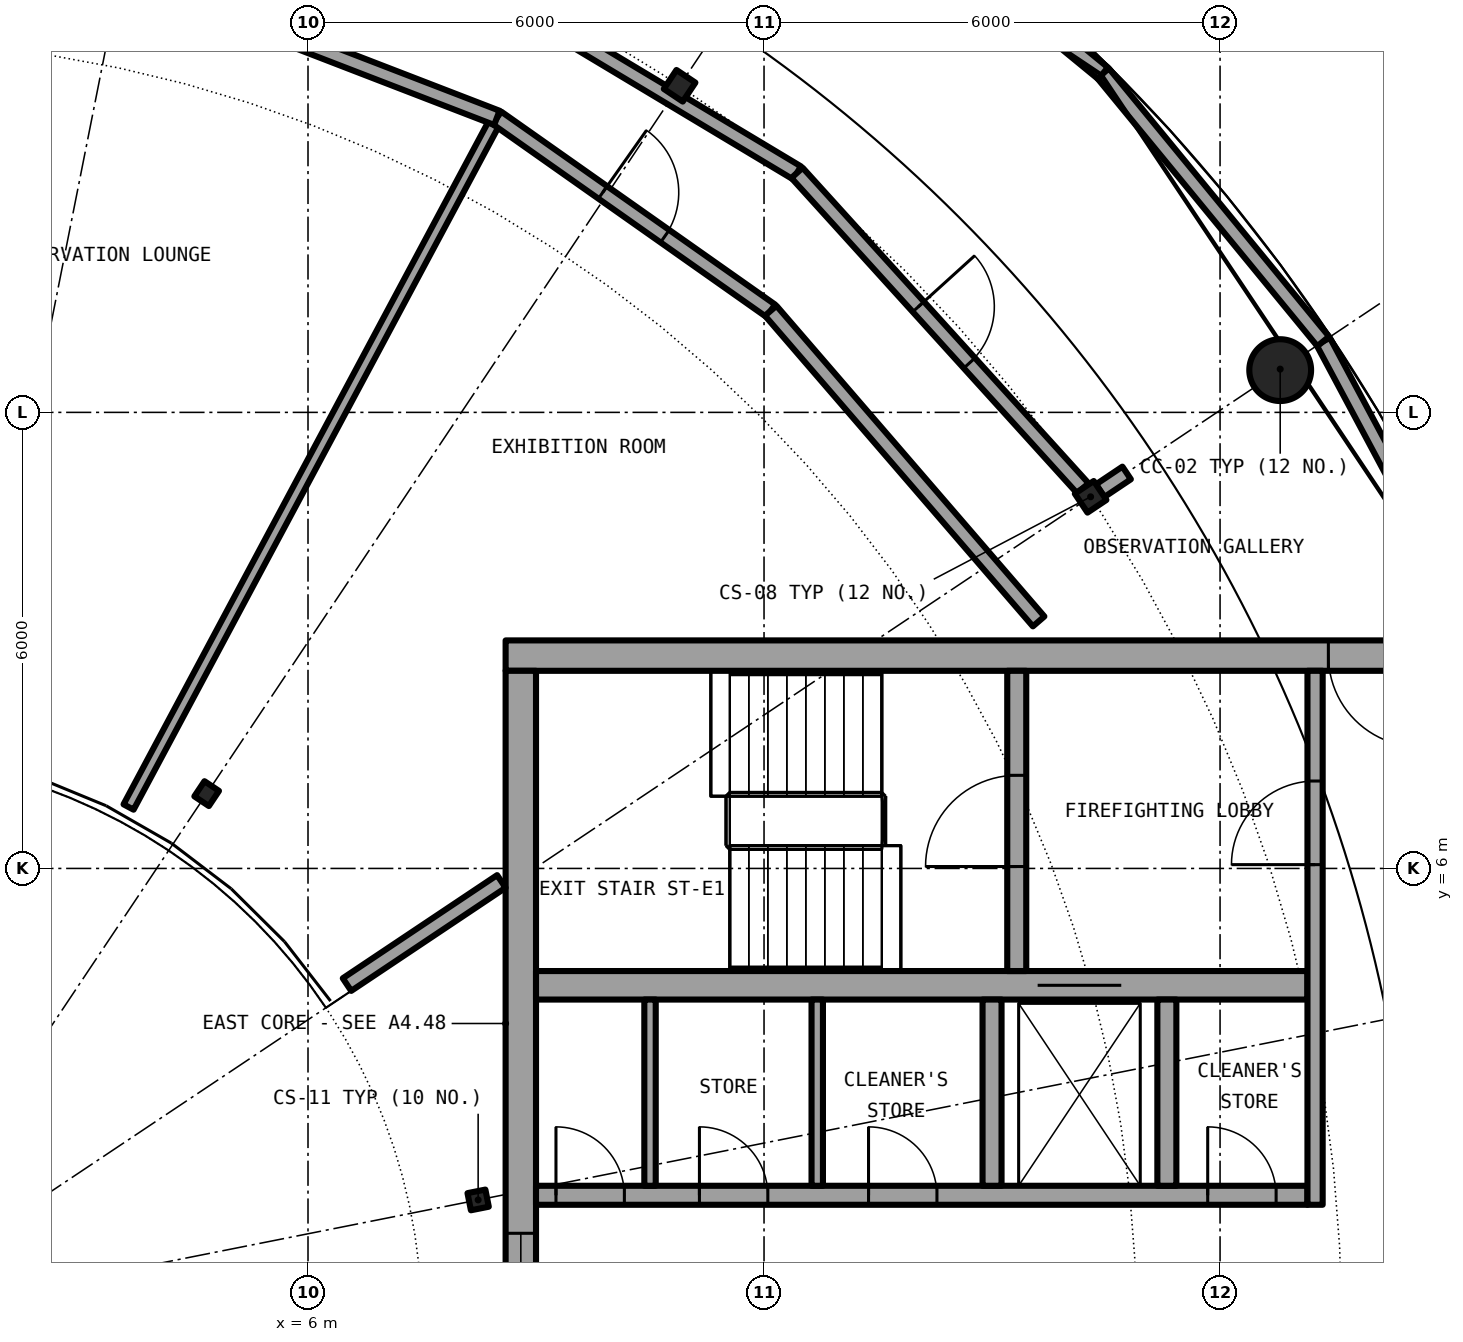
"""IFC4 building model, lengths in metres.
Left out: names, types, materials, properties, quantities, classifications, styles, units other than length and angle.
Written with IfcOpenShell. Run it as: python <this file> out.ifc"""

import sys

from ifc_helpers import new_model, si_unit, direction, frame, frame_2d, origin, origin_2d, place, context, subcontext, project, spatial, rectangle, hollow_circle, i_section, extrude, element, fill, save


model = new_model("IFC4")
c1 = context("Model", 3, precision=1e-05, world=origin(), true_north=direction((0.0, 1.0)))
c2 = subcontext(c1, "Body", "Model", "MODEL_VIEW")
j1 = project(units=[si_unit("LENGTHUNIT", "METRE"), si_unit("PLANEANGLEUNIT", "RADIAN")], contexts=[c1])
p1 = place(None, origin())
s1 = spatial("IfcSite", under=j1, at=p1, CompositionType="ELEMENT")
p2 = place(p1, origin())
s2 = spatial("IfcBuilding", under=s1, at=p2, CompositionType="ELEMENT")
p3 = place(p2, frame((0.0, 0.0, 255.4)))
s3 = spatial("IfcBuildingStorey", under=s2, at=p3, CompositionType="ELEMENT", Elevation=255.4)
p4 = place(p3, frame((18.791, 12.556, 0.0), z_axis=(0.0, 0.0, 1.0), x_axis=(1.0, 0.0, 0.0)))
e1 = element("IfcColumn", 1, at=p4, inside=s3, PredefinedType="COLUMN", context=c2, shape_type="SweptSolid", body=[
    extrude(hollow_circle(Radius=0.406, WallThickness=0.03, at=origin_2d()), origin(), (0.0, 0.0, 1.0), 6.1),
])
for number, where, z_axis, x_axis in (
    (2, (16.297, 10.889, 0.0), (0.0, 0.0, 1.0), (0.831, 0.556, 0.0)),
    (3, (10.889, 16.297, 0.0), (0.0, 0.0, 1.0), (0.556, 0.831, 0.0)),
):
    element("IfcColumn", number, at=place(p3, frame(where, z_axis=z_axis, x_axis=x_axis)), inside=s3, PredefinedType="COLUMN", context=c2, shape_type="SweptSolid", body=[
        extrude(i_section(OverallWidth=0.3, OverallDepth=0.3, WebThickness=0.011, FlangeThickness=0.019, FilletRadius=0.027, at=origin_2d()), origin(), (0.0, 0.0, 1.0), 6.1),
    ])
for number, where, z_axis, x_axis in (
    (4, (8.239, 1.639, 0.0), (0.0, 0.0, 1.0), (0.981, 0.195, 0.0)),
    (5, (4.667, 6.984, 0.0), (0.0, 0.0, 1.0), (0.556, 0.831, 0.0)),
):
    element("IfcColumn", number, at=place(p3, frame(where, z_axis=z_axis, x_axis=x_axis)), inside=s3, PredefinedType="COLUMN", context=c2, shape_type="SweptSolid", body=[
        extrude(i_section(OverallWidth=0.24, OverallDepth=0.23, WebThickness=0.008, FlangeThickness=0.012, FilletRadius=0.021, at=origin_2d()), origin(), (0.0, 0.0, 1.0), 6.1),
    ])
p5 = place(p3, frame((21.508, 8.909, 6.1), z_axis=(0.0, 0.0, 1.0), x_axis=(-0.471334945511, 0.881954289711, 0.0)))
e6 = element("IfcWall", 6, at=p5, inside=s3, PredefinedType="PARAPET", context=c2, shape_type="SweptSolid", body=[
    extrude(rectangle(XDim=4.564, YDim=0.2, at=frame_2d((2.282, 0.0))), origin(), (0.0, 0.0, 1.0), 1.1),
])
for number, where, z_axis, x_axis in (
    (7, (19.357, 12.934, 6.1), (0.0, 0.0, 1.0), (-0.635, 0.773, 0.0)),
    (8, (16.461, 16.461, 6.1), (0.0, 0.0, 1.0), (-0.773, 0.635, 0.0)),
):
    element("IfcWall", number, at=place(p3, frame(where, z_axis=z_axis, x_axis=x_axis)), inside=s3, PredefinedType="PARAPET", context=c2, shape_type="SweptSolid", body=[
        extrude(rectangle(XDim=4.563, YDim=0.2, at=frame_2d((2.282, 0.0))), origin(), (0.0, 0.0, 1.0), 1.1),
    ])
p6 = place(p3, frame((21.1, 8.8, 0.0), z_axis=(0.0, 0.0, 1.0), x_axis=(-1.0, 0.0, 0.0)))
e9 = element("IfcWall", 9, at=p6, inside=s3, PredefinedType="SHEAR", context=c2, shape_type="SweptSolid", body=[
    extrude(rectangle(XDim=12.5, YDim=0.4, at=frame_2d((6.25, 0.0))), origin(), (0.0, 0.0, 1.0), 6.1),
])
p7 = place(p6, frame((0.475, 0.0, 0.0)))
e10 = element("IfcOpeningElement", 10, at=p7, cuts=e9, PredefinedType="OPENING", context=c2, shape_type="SweptSolid", body=[
    extrude(rectangle(XDim=1.2, YDim=2.3, at=frame_2d((0.6, 1.15))), frame((0.0, 0.21, 0.0), z_axis=(0.0, -1.0, 0.0), x_axis=(1.0, 0.0, 0.0)), (0.0, 0.0, 1.0), 0.42),
])
p8 = place(p3, frame((8.8, -8.6, 0.0), z_axis=(0.0, 0.0, 1.0), x_axis=(0.0, 1.0, 0.0)))
e11 = element("IfcWall", 11, at=p8, inside=s3, PredefinedType="SHEAR", context=c2, shape_type="SweptSolid", body=[
    extrude(rectangle(XDim=17.2, YDim=0.4, at=frame_2d((8.6, 0.0))), origin(), (0.0, 0.0, 1.0), 6.1),
])
p9 = place(p8, frame((7.4, 0.0, 0.1)))
e12 = element("IfcOpeningElement", 12, at=p9, cuts=e11, PredefinedType="OPENING", context=c2, shape_type="SweptSolid", body=[
    extrude(rectangle(XDim=2.4, YDim=2.2, at=frame_2d((1.2, 1.1))), frame((0.0, 0.21, 0.0), z_axis=(0.0, -1.0, 0.0), x_axis=(1.0, 0.0, 0.0)), (0.0, 0.0, 1.0), 0.42),
])
p10 = place(p3, frame((9.0, 1.7, 0.0), z_axis=(0.0, 0.0, 1.0), x_axis=(1.0, 0.0, 0.0)))
e13 = element("IfcWall", 13, at=p10, inside=s3, PredefinedType="SHEAR", context=c2, shape_type="SweptSolid", body=[
    extrude(rectangle(XDim=10.15, YDim=0.25, at=frame_2d((5.075, 0.0))), origin(), (0.0, 0.0, 1.0), 6.1),
])
p11 = place(p10, frame((0.262, 0.0, 0.0)))
e14 = element("IfcOpeningElement", 14, at=p11, cuts=e13, PredefinedType="OPENING", context=c2, shape_type="SweptSolid", body=[
    extrude(rectangle(XDim=0.9, YDim=2.3, at=frame_2d((0.45, 1.15))), frame((0.0, 0.135, 0.0), z_axis=(0.0, -1.0, 0.0), x_axis=(1.0, 0.0, 0.0)), (0.0, 0.0, 1.0), 0.27),
])
p12 = place(p10, frame((2.15, 0.0, 0.0)))
e15 = element("IfcOpeningElement", 15, at=p12, cuts=e13, PredefinedType="OPENING", context=c2, shape_type="SweptSolid", body=[
    extrude(rectangle(XDim=0.9, YDim=2.3, at=frame_2d((0.45, 1.15))), frame((0.0, 0.135, 0.0), z_axis=(0.0, -1.0, 0.0), x_axis=(1.0, 0.0, 0.0)), (0.0, 0.0, 1.0), 0.27),
])
p13 = place(p10, frame((4.375, 0.0, 0.0)))
e16 = element("IfcOpeningElement", 16, at=p13, cuts=e13, PredefinedType="OPENING", context=c2, shape_type="SweptSolid", body=[
    extrude(rectangle(XDim=0.9, YDim=2.3, at=frame_2d((0.45, 1.15))), frame((0.0, 0.135, 0.0), z_axis=(0.0, -1.0, 0.0), x_axis=(1.0, 0.0, 0.0)), (0.0, 0.0, 1.0), 0.27),
])
p14 = place(p10, frame((8.837, 0.0, 0.0)))
e17 = element("IfcOpeningElement", 17, at=p14, cuts=e13, PredefinedType="OPENING", context=c2, shape_type="SweptSolid", body=[
    extrude(rectangle(XDim=0.9, YDim=2.3, at=frame_2d((0.45, 1.15))), frame((0.0, 0.135, 0.0), z_axis=(0.0, -1.0, 0.0), x_axis=(1.0, 0.0, 0.0)), (0.0, 0.0, 1.0), 0.27),
])
p15 = place(p3, frame((9.0, 4.462, 0.0), z_axis=(0.0, 0.0, 1.0), x_axis=(1.0, 0.0, 0.0)))
e18 = element("IfcWall", 18, at=p15, inside=s3, PredefinedType="SHEAR", context=c2, shape_type="SweptSolid", body=[
    extrude(rectangle(XDim=10.15, YDim=0.375, at=frame_2d((5.075, 0.0))), origin(), (0.0, 0.0, 1.0), 6.1),
])
p16 = place(p15, frame((6.6, 0.0, 0.0)))
e19 = element("IfcOpeningElement", 19, at=p16, cuts=e18, PredefinedType="OPENING", context=c2, shape_type="SweptSolid", body=[
    extrude(rectangle(XDim=1.1, YDim=2.3, at=frame_2d((0.55, 1.15))), frame((0.0, 0.198, 0.0), z_axis=(0.0, -1.0, 0.0), x_axis=(1.0, 0.0, 0.0)), (0.0, 0.0, 1.0), 0.395),
])
p17 = place(p3, frame((15.325, 4.65, 0.0), z_axis=(0.0, 0.0, 1.0), x_axis=(0.0, 1.0, 0.0)))
e20 = element("IfcWall", 20, at=p17, inside=s3, PredefinedType="SHEAR", context=c2, shape_type="SweptSolid", body=[
    extrude(rectangle(XDim=3.95, YDim=0.25, at=frame_2d((1.975, 0.0))), origin(), (0.0, 0.0, 1.0), 6.1),
])
p18 = place(p17, frame((1.375, 0.0, 0.0)))
e21 = element("IfcOpeningElement", 21, at=p18, cuts=e20, PredefinedType="OPENING", context=c2, shape_type="SweptSolid", body=[
    extrude(rectangle(XDim=1.2, YDim=2.3, at=frame_2d((0.6, 1.15))), frame((0.0, 0.135, 0.0), z_axis=(0.0, -1.0, 0.0), x_axis=(1.0, 0.0, 0.0)), (0.0, 0.0, 1.0), 0.27),
])
for number, where, z_axis, x_axis in (
    (22, (15.0, 1.825, 0.0), (0.0, 0.0, 1.0), (0.0, 1.0, 0.0)),
    (23, (17.3, 1.825, 0.0), (0.0, 0.0, 1.0), (0.0, 1.0, 0.0)),
):
    element("IfcWall", number, at=place(p3, frame(where, z_axis=z_axis, x_axis=x_axis)), inside=s3, PredefinedType="SOLIDWALL", context=c2, shape_type="SweptSolid", body=[
        extrude(rectangle(XDim=2.45, YDim=0.25, at=frame_2d((1.225, 0.0))), origin(), (0.0, 0.0, 1.0), 5.75),
    ])
p19 = place(p3, frame((19.25, 1.575, 0.0), z_axis=(0.0, 0.0, 1.0), x_axis=(0.0, 1.0, 0.0)))
e24 = element("IfcWall", 24, at=p19, inside=s3, PredefinedType="SOLIDWALL", context=c2, shape_type="SweptSolid", body=[
    extrude(rectangle(XDim=7.025, YDim=0.2, at=frame_2d((3.513, 0.0))), origin(), (0.0, 0.0, 1.0), 5.75),
])
p20 = place(p19, frame((4.475, 0.0, 0.0)))
e25 = element("IfcOpeningElement", 25, at=p20, cuts=e24, PredefinedType="OPENING", context=c2, shape_type="SweptSolid", body=[
    extrude(rectangle(XDim=1.1, YDim=2.3, at=frame_2d((0.55, 1.15))), frame((0.0, 0.11, 0.0), z_axis=(0.0, -1.0, 0.0), x_axis=(1.0, 0.0, 0.0)), (0.0, 0.0, 1.0), 0.22),
])
for number, where, z_axis, x_axis in (
    (26, (10.5, 1.825, 0.0), (0.0, 0.0, 1.0), (0.0, 1.0, 0.0)),
    (27, (12.7, 1.825, 0.0), (0.0, 0.0, 1.0), (0.0, 1.0, 0.0)),
):
    element("IfcWall", number, at=place(p3, frame(where, z_axis=z_axis, x_axis=x_axis)), inside=s3, PredefinedType="PARTITIONING", context=c2, shape_type="SweptSolid", body=[
        extrude(rectangle(XDim=2.45, YDim=0.15, at=frame_2d((1.225, 0.0))), origin(), (0.0, 0.0, 1.0), 5.75),
    ])
p21 = place(p3, frame((3.639, 6.808, 0.0), z_axis=(0.0, 0.0, 1.0), x_axis=(0.471384277318, 0.881927923981, 0.0)))
e28 = element("IfcWall", 28, at=p21, inside=s3, PredefinedType="PARTITIONING", context=c2, shape_type="SweptSolid", body=[
    extrude(rectangle(XDim=10.281, YDim=0.15, at=frame_2d((5.14, 0.0))), origin(), (0.0, 0.0, 1.0), 5.75),
])
p22 = place(p3, frame((16.423, 10.97, 0.0), z_axis=(0.0, 0.0, 1.0), x_axis=(0.830972164162, 0.556313996218, 0.0)))
e29 = element("IfcWall", 29, at=p22, inside=s3, PredefinedType="PARTITIONING", context=c2, shape_type="SweptSolid", body=[
    extrude(rectangle(XDim=0.419, YDim=0.2, at=frame_2d((0.209, 0.0))), origin(), (0.0, 0.0, 1.0), 5.75),
])
p23 = place(p3, frame((6.513, 4.472, 0.0), z_axis=(0.0, 0.0, 1.0), x_axis=(0.831450132577, 0.555599385382, 0.0)))
e30 = element("IfcWall", 30, at=p23, inside=s3, PredefinedType="PARTITIONING", context=c2, shape_type="SweptSolid", body=[
    extrude(rectangle(XDim=2.443, YDim=0.2, at=frame_2d((1.221, 0.0))), origin(), (0.0, 0.0, 1.0), 5.75),
])
p24 = place(p3, frame((8.485, 15.875, 0.0), z_axis=(0.0, 0.0, 1.0), x_axis=(0.817507922666, -0.575917352038, 0.0)))
e31 = element("IfcWall", 31, at=p24, inside=s3, PredefinedType="PARTITIONING", context=c2, shape_type="SweptSolid", body=[
    extrude(rectangle(XDim=4.407, YDim=0.2, at=frame_2d((2.204, 0.0))), origin(), (0.0, 0.0, 1.0), 5.75),
])
p25 = place(p24, frame((1.704, 0.0, 0.0)))
e32 = element("IfcOpeningElement", 32, at=p25, cuts=e31, PredefinedType="OPENING", context=c2, shape_type="SweptSolid", body=[
    extrude(rectangle(XDim=1.0, YDim=2.3, at=frame_2d((0.5, 1.15))), frame((0.0, 0.11, 0.0), z_axis=(0.0, -1.0, 0.0), x_axis=(1.0, 0.0, 0.0)), (0.0, 0.0, 1.0), 0.22),
])
p26 = place(p3, frame((12.088, 13.337, 0.0), z_axis=(0.0, 0.0, 1.0), x_axis=(0.653146301984, -0.757231740093, 0.0)))
e33 = element("IfcWall", 33, at=p26, inside=s3, PredefinedType="PARTITIONING", context=c2, shape_type="SweptSolid", body=[
    extrude(rectangle(XDim=5.397, YDim=0.2, at=frame_2d((2.699, 0.0))), origin(), (0.0, 0.0, 1.0), 5.75),
])
p27 = place(p3, frame((4.374, 17.461, 0.0), z_axis=(0.0, 0.0, 1.0), x_axis=(0.932983851272, -0.35991823136, 0.0)))
e34 = element("IfcWall", 34, at=p27, inside=s3, PredefinedType="PARTITIONING", context=c2, shape_type="SweptSolid", body=[
    extrude(rectangle(XDim=4.406, YDim=0.2, at=frame_2d((2.203, 0.0))), origin(), (0.0, 0.0, 1.0), 5.75),
])
p28 = place(p3, frame((7.501, 18.108, 0.0), z_axis=(0.0, 0.0, 1.0), x_axis=(0.857710084627, -0.514133650648, 0.0)))
e35 = element("IfcWall", 35, at=p28, inside=s3, PredefinedType="PARTITIONING", context=c2, shape_type="SweptSolid", body=[
    extrude(rectangle(XDim=5.751, YDim=0.2, at=frame_2d((2.876, 0.0))), origin(), (0.0, 0.0, 1.0), 5.5),
])
p29 = place(p3, frame((12.434, 15.151, 0.0), z_axis=(0.0, 0.0, 1.0), x_axis=(0.671532887857, -0.740974750262, 0.0)))
e36 = element("IfcWall", 36, at=p29, inside=s3, PredefinedType="PARTITIONING", context=c2, shape_type="SweptSolid", body=[
    extrude(rectangle(XDim=5.601, YDim=0.2, at=frame_2d((2.8, 0.0))), origin(), (0.0, 0.0, 1.0), 5.5),
])
p30 = place(p29, frame((2.377, 0.0, 0.0)))
e37 = element("IfcOpeningElement", 37, at=p30, cuts=e36, PredefinedType="OPENING", context=c2, shape_type="SweptSolid", body=[
    extrude(rectangle(XDim=1.0, YDim=2.3, at=frame_2d((0.5, 1.15))), frame((0.0, 0.11, 0.0), z_axis=(0.0, -1.0, 0.0), x_axis=(1.0, 0.0, 0.0)), (0.0, 0.0, 1.0), 0.22),
])
p31 = place(p16, origin())
e38 = element("IfcDoor", 38, at=p31, inside=s3, OperationType="DOUBLE_DOOR_SLIDING", PredefinedType="DOOR", context=c2, shape_type="SweptSolid", body=[
    extrude(rectangle(XDim=1.1, YDim=2.3, at=frame_2d((0.55, 1.15))), frame((0.0, 0.025, 0.0), z_axis=(0.0, -1.0, 0.0), x_axis=(1.0, 0.0, 0.0)), (0.0, 0.0, 1.0), 0.05),
])
fill(e19, e38)
p32 = place(p11, origin())
e39 = element("IfcDoor", 39, at=p32, inside=s3, OperationType="SINGLE_SWING_RIGHT", PredefinedType="DOOR", context=c2, shape_type="SweptSolid", body=[
    extrude(rectangle(XDim=0.9, YDim=2.3, at=frame_2d((0.45, 1.15))), frame((0.0, 0.025, 0.0), z_axis=(0.0, -1.0, 0.0), x_axis=(1.0, 0.0, 0.0)), (0.0, 0.0, 1.0), 0.05),
])
fill(e14, e39)
p33 = place(p12, origin())
e40 = element("IfcDoor", 40, at=p33, inside=s3, OperationType="SINGLE_SWING_RIGHT", PredefinedType="DOOR", context=c2, shape_type="SweptSolid", body=[
    extrude(rectangle(XDim=0.9, YDim=2.3, at=frame_2d((0.45, 1.15))), frame((0.0, 0.025, 0.0), z_axis=(0.0, -1.0, 0.0), x_axis=(1.0, 0.0, 0.0)), (0.0, 0.0, 1.0), 0.05),
])
fill(e15, e40)
p34 = place(p13, origin())
e41 = element("IfcDoor", 41, at=p34, inside=s3, OperationType="SINGLE_SWING_RIGHT", PredefinedType="DOOR", context=c2, shape_type="SweptSolid", body=[
    extrude(rectangle(XDim=0.9, YDim=2.3, at=frame_2d((0.45, 1.15))), frame((0.0, 0.025, 0.0), z_axis=(0.0, -1.0, 0.0), x_axis=(1.0, 0.0, 0.0)), (0.0, 0.0, 1.0), 0.05),
])
fill(e16, e41)
p35 = place(p14, origin())
e42 = element("IfcDoor", 42, at=p35, inside=s3, OperationType="SINGLE_SWING_LEFT", PredefinedType="DOOR", context=c2, shape_type="SweptSolid", body=[
    extrude(rectangle(XDim=0.9, YDim=2.3, at=frame_2d((0.45, 1.15))), frame((0.0, 0.025, 0.0), z_axis=(0.0, -1.0, 0.0), x_axis=(1.0, 0.0, 0.0)), (0.0, 0.0, 1.0), 0.05),
])
fill(e17, e42)
p36 = place(p18, origin())
e43 = element("IfcDoor", 43, at=p36, inside=s3, OperationType="SINGLE_SWING_LEFT", PredefinedType="DOOR", context=c2, shape_type="SweptSolid", body=[
    extrude(rectangle(XDim=1.2, YDim=2.3, at=frame_2d((0.6, 1.15))), frame((0.0, 0.025, 0.0), z_axis=(0.0, -1.0, 0.0), x_axis=(1.0, 0.0, 0.0)), (0.0, 0.0, 1.0), 0.05),
])
fill(e21, e43)
p37 = place(p20, origin())
e44 = element("IfcDoor", 44, at=p37, inside=s3, OperationType="SINGLE_SWING_LEFT", PredefinedType="DOOR", context=c2, shape_type="SweptSolid", body=[
    extrude(rectangle(XDim=1.1, YDim=2.3, at=frame_2d((0.55, 1.15))), frame((0.0, 0.025, 0.0), z_axis=(0.0, -1.0, 0.0), x_axis=(1.0, 0.0, 0.0)), (0.0, 0.0, 1.0), 0.05),
])
fill(e25, e44)
p38 = place(p7, origin())
e45 = element("IfcDoor", 45, at=p38, inside=s3, OperationType="SINGLE_SWING_RIGHT", PredefinedType="DOOR", context=c2, shape_type="SweptSolid", body=[
    extrude(rectangle(XDim=1.2, YDim=2.3, at=frame_2d((0.6, 1.15))), frame((0.0, 0.025, 0.0), z_axis=(0.0, -1.0, 0.0), x_axis=(1.0, 0.0, 0.0)), (0.0, 0.0, 1.0), 0.05),
])
fill(e10, e45)
p39 = place(p9, origin())
e46 = element("IfcWindow", 46, at=p39, inside=s3, PartitioningType="SINGLE_PANEL", PredefinedType="WINDOW", context=c2, shape_type="SweptSolid", body=[
    extrude(rectangle(XDim=2.4, YDim=2.2, at=frame_2d((1.2, 1.1))), frame((0.0, 0.03, 0.0), z_axis=(0.0, -1.0, 0.0), x_axis=(1.0, 0.0, 0.0)), (0.0, 0.0, 1.0), 0.06),
])
fill(e12, e46)
p40 = place(p30, origin())
e47 = element("IfcDoor", 47, at=p40, inside=s3, OperationType="SINGLE_SWING_RIGHT", PredefinedType="DOOR", context=c2, shape_type="SweptSolid", body=[
    extrude(rectangle(XDim=1.0, YDim=2.3, at=frame_2d((0.5, 1.15))), frame((0.0, 0.025, 0.0), z_axis=(0.0, -1.0, 0.0), x_axis=(1.0, 0.0, 0.0)), (0.0, 0.0, 1.0), 0.05),
])
fill(e37, e47)
p41 = place(p25, origin())
e48 = element("IfcDoor", 48, at=p41, inside=s3, OperationType="SINGLE_SWING_LEFT", PredefinedType="DOOR", context=c2, shape_type="SweptSolid", body=[
    extrude(rectangle(XDim=1.0, YDim=2.3, at=frame_2d((0.5, 1.15))), frame((0.0, 0.025, 0.0), z_axis=(0.0, -1.0, 0.0), x_axis=(1.0, 0.0, 0.0)), (0.0, 0.0, 1.0), 0.05),
])
fill(e32, e48)
save(model, sys.argv[1])
